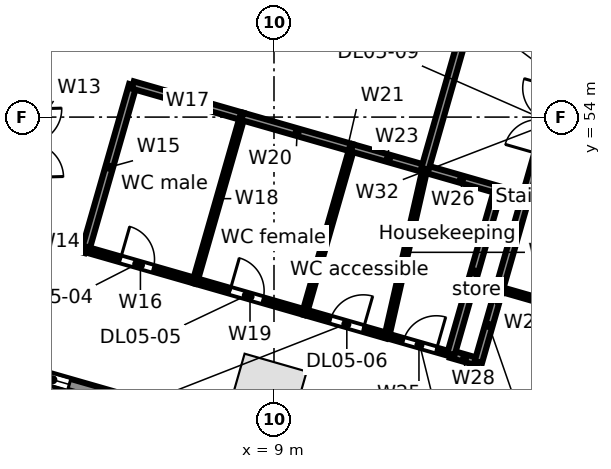
"""IFC4 building model, lengths in metres.
Left out: names, types, materials, properties, quantities, classifications, styles, units other than length and angle.
Written with IfcOpenShell. Run it as: python <this file> out.ifc"""

import sys

from ifc_helpers import new_model, si_unit, direction, frame, frame_2d, origin, origin_2d, place, context, subcontext, project, spatial, rectangle, extrude, element, fill, save


model = new_model("IFC4")
c1 = context("Model", 3, precision=1e-05, world=origin(), true_north=direction((0.0, 1.0)))
c2 = subcontext(c1, "Body", "Model", "MODEL_VIEW")
j1 = project(units=[si_unit("LENGTHUNIT", "METRE"), si_unit("PLANEANGLEUNIT", "RADIAN")], contexts=[c1])
p1 = place(None, origin())
s1 = spatial("IfcSite", under=j1, at=p1, CompositionType="ELEMENT")
p2 = place(p1, origin())
s2 = spatial("IfcBuilding", under=s1, at=p2, CompositionType="ELEMENT")
p3 = place(p2, frame((0.0, 0.0, 31.5)))
s3 = spatial("IfcBuildingStorey", under=s2, at=p3, CompositionType="ELEMENT", Elevation=31.5)
p4 = place(p3, frame((8.81, 46.722, 0.0), z_axis=(0.0, 0.0, 1.0), x_axis=(0.961261695938, -0.275637355817, 0.0)))
e1 = element("IfcColumn", 1, at=p4, inside=s3, PredefinedType="COLUMN", context=c2, shape_type="SweptSolid", body=[
    extrude(rectangle(XDim=1.7, YDim=1.7, at=origin_2d()), origin(), (0.0, 0.0, 1.0), 5.0),
])
p5 = place(p3, frame((25.398, 40.717, 0.0), z_axis=(0.0, 0.0, 1.0), x_axis=(-0.961262423262, 0.275634819324, 0.0)))
e2 = element("IfcWall", 2, at=p5, inside=s3, PredefinedType="STANDARD", context=c2, shape_type="SweptSolid", body=[
    extrude(rectangle(XDim=26.359, YDim=0.3, at=frame_2d((13.179, 0.0))), origin(), (0.0, 0.0, 1.0), 4.68),
])
p6 = place(p5, frame((22.664, 0.0, 0.6)))
e3 = element("IfcOpeningElement", 3, at=p6, cuts=e2, PredefinedType="OPENING", context=c2, shape_type="SweptSolid", body=[
    extrude(rectangle(XDim=0.9, YDim=3.2, at=frame_2d((0.45, 1.6))), frame((0.0, 0.16, 0.0), z_axis=(0.0, -1.0, 0.0), x_axis=(1.0, 0.0, 0.0)), (0.0, 0.0, 1.0), 0.32),
])
p7 = place(p5, frame((13.844, 0.0, 0.6)))
e4 = element("IfcOpeningElement", 4, at=p7, cuts=e2, PredefinedType="OPENING", context=c2, shape_type="SweptSolid", body=[
    extrude(rectangle(XDim=0.9, YDim=3.2, at=frame_2d((0.45, 1.6))), frame((0.0, 0.16, 0.0), z_axis=(0.0, -1.0, 0.0), x_axis=(1.0, 0.0, 0.0)), (0.0, 0.0, 1.0), 0.32),
])
p8 = place(p5, frame((5.023, 0.0, 0.6)))
e5 = element("IfcOpeningElement", 5, at=p8, cuts=e2, PredefinedType="OPENING", context=c2, shape_type="SweptSolid", body=[
    extrude(rectangle(XDim=0.9, YDim=3.2, at=frame_2d((0.45, 1.6))), frame((0.0, 0.16, 0.0), z_axis=(0.0, -1.0, 0.0), x_axis=(1.0, 0.0, 0.0)), (0.0, 0.0, 1.0), 0.32),
])
p9 = place(p3, frame((2.601, 50.932, 0.0), z_axis=(0.0, 0.0, 1.0), x_axis=(0.961197773994, -0.27586018065, 0.0)))
e6 = element("IfcWall", 6, at=p9, inside=s3, PredefinedType="PARTITIONING", context=c2, shape_type="SweptSolid", body=[
    extrude(rectangle(XDim=1.5, YDim=0.2, at=frame_2d((0.75, 0.0))), origin(), (0.0, 0.0, 1.0), 4.68),
])
p10 = place(p3, frame((4.043, 50.518, 0.0), z_axis=(0.0, 0.0, 1.0), x_axis=(0.275745553681, 0.96123066411, 0.0)))
e7 = element("IfcWall", 7, at=p10, inside=s3, PredefinedType="PARTITIONING", context=c2, shape_type="SweptSolid", body=[
    extrude(rectangle(XDim=4.5, YDim=0.2, at=frame_2d((2.25, 0.0))), origin(), (0.0, 0.0, 1.0), 4.68),
])
p11 = place(p3, frame((4.043, 50.518, 0.0), z_axis=(0.0, 0.0, 1.0), x_axis=(0.961247103494, -0.275688240636, 0.0)))
e8 = element("IfcWall", 8, at=p11, inside=s3, PredefinedType="PARTITIONING", context=c2, shape_type="SweptSolid", body=[
    extrude(rectangle(XDim=3.0, YDim=0.15, at=frame_2d((1.5, 0.0))), origin(), (0.0, 0.0, 1.0), 4.68),
])
p12 = place(p11, frame((0.95, 0.0, 0.0)))
e9 = element("IfcOpeningElement", 9, at=p12, cuts=e8, PredefinedType="OPENING", context=c2, shape_type="SweptSolid", body=[
    extrude(rectangle(XDim=0.9, YDim=2.1, at=frame_2d((0.45, 1.05))), frame((0.0, 0.085, 0.0), z_axis=(0.0, -1.0, 0.0), x_axis=(1.0, 0.0, 0.0)), (0.0, 0.0, 1.0), 0.17),
])
p13 = place(p3, frame((5.284, 54.844, 0.0), z_axis=(0.0, 0.0, 1.0), x_axis=(0.961243927922, -0.275699312717, 0.0)))
e10 = element("IfcWall", 10, at=p13, inside=s3, PredefinedType="PARTITIONING", context=c2, shape_type="SweptSolid", body=[
    extrude(rectangle(XDim=2.999, YDim=0.2, at=frame_2d((1.5, 0.0))), origin(), (0.0, 0.0, 1.0), 4.68),
])
p14 = place(p3, frame((6.927, 49.691, 0.0), z_axis=(0.0, 0.0, 1.0), x_axis=(0.275530671241, 0.961292280841, 0.0)))
e11 = element("IfcWall", 11, at=p14, inside=s3, PredefinedType="PARTITIONING", context=c2, shape_type="SweptSolid", body=[
    extrude(rectangle(XDim=4.5, YDim=0.125, at=frame_2d((2.25, 0.0))), origin(), (0.0, 0.0, 1.0), 4.68),
])
p15 = place(p3, frame((6.927, 49.691, 0.0), z_axis=(0.0, 0.0, 1.0), x_axis=(0.961268664977, -0.27561305073, 0.0)))
e12 = element("IfcWall", 12, at=p15, inside=s3, PredefinedType="PARTITIONING", context=c2, shape_type="SweptSolid", body=[
    extrude(rectangle(XDim=3.0, YDim=0.15, at=frame_2d((1.5, 0.0))), origin(), (0.0, 0.0, 1.0), 3.742),
])
p16 = place(p15, frame((0.95, 0.0, 0.0)))
e13 = element("IfcOpeningElement", 13, at=p16, cuts=e12, PredefinedType="OPENING", context=c2, shape_type="SweptSolid", body=[
    extrude(rectangle(XDim=0.9, YDim=2.1, at=frame_2d((0.45, 1.05))), frame((0.0, 0.085, 0.0), z_axis=(0.0, -1.0, 0.0), x_axis=(1.0, 0.0, 0.0)), (0.0, 0.0, 1.0), 0.17),
])
p17 = place(p3, frame((8.167, 54.017, 0.0), z_axis=(0.0, 0.0, 1.0), x_axis=(0.961247103494, -0.275688240636, 0.0)))
e14 = element("IfcWall", 14, at=p17, inside=s3, PredefinedType="PARTITIONING", context=c2, shape_type="SweptSolid", body=[
    extrude(rectangle(XDim=3.0, YDim=0.2, at=frame_2d((1.5, 0.0))), origin(), (0.0, 0.0, 1.0), 3.742),
])
p18 = place(p3, frame((9.811, 48.864, 0.0), z_axis=(0.0, 0.0, 1.0), x_axis=(0.275545040649, 0.96128816209, 0.0)))
e15 = element("IfcWall", 15, at=p18, inside=s3, PredefinedType="PARTITIONING", context=c2, shape_type="SweptSolid", body=[
    extrude(rectangle(XDim=4.5, YDim=0.125, at=frame_2d((2.25, 0.0))), origin(), (0.0, 0.0, 1.0), 4.68),
])
p19 = place(p3, frame((9.811, 48.864, 0.0), z_axis=(0.0, 0.0, 1.0), x_axis=(0.961236680145, -0.275724581318, 0.0)))
e16 = element("IfcWall", 16, at=p19, inside=s3, PredefinedType="PARTITIONING", context=c2, shape_type="SweptSolid", body=[
    extrude(rectangle(XDim=2.249, YDim=0.15, at=frame_2d((1.125, 0.0))), origin(), (0.0, 0.0, 1.0), 4.68),
])
p20 = place(p19, frame((0.7, 0.0, 0.0)))
e17 = element("IfcOpeningElement", 17, at=p20, cuts=e16, PredefinedType="OPENING", context=c2, shape_type="SweptSolid", body=[
    extrude(rectangle(XDim=0.9, YDim=2.1, at=frame_2d((0.45, 1.05))), frame((0.0, 0.085, 0.0), z_axis=(0.0, -1.0, 0.0), x_axis=(1.0, 0.0, 0.0)), (0.0, 0.0, 1.0), 0.17),
])
p21 = place(p3, frame((11.051, 53.19, 0.0), z_axis=(0.0, 0.0, 1.0), x_axis=(0.961316434736, -0.275446387355, 0.0)))
e18 = element("IfcWall", 18, at=p21, inside=s3, PredefinedType="PARTITIONING", context=c2, shape_type="SweptSolid", body=[
    extrude(rectangle(XDim=2.0, YDim=0.2, at=frame_2d((1.0, 0.0))), origin(), (0.0, 0.0, 1.0), 4.68),
])
p22 = place(p3, frame((11.973, 48.244, 0.0), z_axis=(0.0, 0.0, 1.0), x_axis=(0.222117362571, 0.975019936845, 0.0)))
e19 = element("IfcWall", 19, at=p22, inside=s3, PredefinedType="PARTITIONING", context=c2, shape_type="SweptSolid", body=[
    extrude(rectangle(XDim=4.508, YDim=0.125, at=frame_2d((2.254, 0.0))), origin(), (0.0, 0.0, 1.0), 4.68),
])
p23 = place(p3, frame((11.973, 48.244, 0.0), z_axis=(0.0, 0.0, 1.0), x_axis=(0.96136592135, -0.275273618907, 0.0)))
e20 = element("IfcWall", 20, at=p23, inside=s3, PredefinedType="PARTITIONING", context=c2, shape_type="SweptSolid", body=[
    extrude(rectangle(XDim=1.751, YDim=0.125, at=frame_2d((0.875, 0.0))), origin(), (0.0, 0.0, 1.0), 4.68),
])
p24 = place(p23, frame((0.45, 0.0, 0.0)))
e21 = element("IfcOpeningElement", 21, at=p24, cuts=e20, PredefinedType="OPENING", context=c2, shape_type="SweptSolid", body=[
    extrude(rectangle(XDim=0.9, YDim=2.1, at=frame_2d((0.45, 1.05))), frame((0.0, 0.073, 0.0), z_axis=(0.0, -1.0, 0.0), x_axis=(1.0, 0.0, 0.0)), (0.0, 0.0, 1.0), 0.145),
])
p25 = place(p3, frame((12.974, 52.639, 0.0), z_axis=(0.0, 0.0, 1.0), x_axis=(0.961270097305, -0.275608055084, 0.0)))
e22 = element("IfcWall", 22, at=p25, inside=s3, PredefinedType="PARTITIONING", context=c2, shape_type="SweptSolid", body=[
    extrude(rectangle(XDim=1.999, YDim=0.2, at=frame_2d((1.0, 0.0))), origin(), (0.0, 0.0, 1.0), 4.68),
])
p26 = place(p3, frame((12.974, 52.639, 0.0), z_axis=(0.0, 0.0, 1.0), x_axis=(0.275299463768, 0.961358520662, 0.0)))
e23 = element("IfcWall", 23, at=p26, inside=s3, PredefinedType="PARTITIONING", context=c2, shape_type="SweptSolid", body=[
    extrude(rectangle(XDim=14.885, YDim=0.2, at=frame_2d((7.443, 0.0))), origin(), (0.0, 0.0, 1.0), 3.742),
])
p27 = place(p3, frame((13.656, 47.762, 0.0), z_axis=(0.0, 0.0, 1.0), x_axis=(0.961154610169, -0.276010534854, 0.0)))
e24 = element("IfcWall", 24, at=p27, inside=s3, PredefinedType="PARTITIONING", context=c2, shape_type="SweptSolid", body=[
    extrude(rectangle(XDim=0.75, YDim=0.2, at=frame_2d((0.375, 0.0))), origin(), (0.0, 0.0, 1.0), 4.68),
])
p28 = place(p3, frame((13.656, 47.762, 0.0), z_axis=(0.0, 0.0, 1.0), x_axis=(0.275545040649, 0.96128816209, 0.0)))
e25 = element("IfcWall", 25, at=p28, inside=s3, PredefinedType="PARTITIONING", context=c2, shape_type="SweptSolid", body=[
    extrude(rectangle(XDim=4.5, YDim=0.2, at=frame_2d((2.25, 0.0))), origin(), (0.0, 0.0, 1.0), 4.68),
])
p29 = place(p3, frame((14.377, 47.555, 0.0), z_axis=(0.0, 0.0, 1.0), x_axis=(0.275446387355, 0.961316434736, 0.0)))
e26 = element("IfcWall", 26, at=p29, inside=s3, PredefinedType="PARTITIONING", context=c2, shape_type="SweptSolid", body=[
    extrude(rectangle(XDim=2.0, YDim=0.2, at=frame_2d((1.0, 0.0))), origin(), (0.0, 0.0, 1.0), 4.68),
])
p30 = place(p3, frame((14.928, 49.478, 0.0), z_axis=(0.0, 0.0, 1.0), x_axis=(0.961243778232, -0.27569983462, 0.0)))
e27 = element("IfcWall", 27, at=p30, inside=s3, PredefinedType="PARTITIONING", context=c2, shape_type="SweptSolid", body=[
    extrude(rectangle(XDim=1.977, YDim=0.125, at=frame_2d((0.988, 0.0))), origin(), (0.0, 0.0, 1.0), 4.68),
])
p31 = place(p3, frame((14.928, 49.478, 0.0), z_axis=(0.0, 0.0, 1.0), x_axis=(0.275674053528, 0.961251172281, 0.0)))
e28 = element("IfcWall", 28, at=p31, inside=s3, PredefinedType="PARTITIONING", context=c2, shape_type="SweptSolid", body=[
    extrude(rectangle(XDim=9.0, YDim=0.2, at=frame_2d((4.5, 0.0))), origin(), (0.0, 0.0, 1.0), 3.742),
])
p32 = place(p31, frame((3.7, 0.0, 0.0)))
e29 = element("IfcOpeningElement", 29, at=p32, cuts=e28, PredefinedType="OPENING", context=c2, shape_type="SweptSolid", body=[
    extrude(rectangle(XDim=1.8, YDim=2.1, at=frame_2d((0.9, 1.05))), frame((0.0, 0.11, 0.0), z_axis=(0.0, -1.0, 0.0), x_axis=(1.0, 0.0, 0.0)), (0.0, 0.0, 1.0), 0.22),
])
p33 = place(p6, origin())
e30 = element("IfcWindow", 30, at=p33, inside=s3, PartitioningType="SINGLE_PANEL", PredefinedType="WINDOW", context=c2, shape_type="SweptSolid", body=[
    extrude(rectangle(XDim=0.9, YDim=3.2, at=frame_2d((0.45, 1.6))), frame((0.0, 0.03, 0.0), z_axis=(0.0, -1.0, 0.0), x_axis=(1.0, 0.0, 0.0)), (0.0, 0.0, 1.0), 0.06),
])
fill(e3, e30)
p34 = place(p12, origin())
e31 = element("IfcDoor", 31, at=p34, inside=s3, OperationType="SINGLE_SWING_LEFT", PredefinedType="DOOR", context=c2, shape_type="SweptSolid", body=[
    extrude(rectangle(XDim=0.9, YDim=2.1, at=frame_2d((0.45, 1.05))), frame((0.0, 0.025, 0.0), z_axis=(0.0, -1.0, 0.0), x_axis=(1.0, 0.0, 0.0)), (0.0, 0.0, 1.0), 0.05),
])
fill(e9, e31)
p35 = place(p16, origin())
e32 = element("IfcDoor", 32, at=p35, inside=s3, OperationType="SINGLE_SWING_LEFT", PredefinedType="DOOR", context=c2, shape_type="SweptSolid", body=[
    extrude(rectangle(XDim=0.9, YDim=2.1, at=frame_2d((0.45, 1.05))), frame((0.0, 0.025, 0.0), z_axis=(0.0, -1.0, 0.0), x_axis=(1.0, 0.0, 0.0)), (0.0, 0.0, 1.0), 0.05),
])
fill(e13, e32)
p36 = place(p20, origin())
e33 = element("IfcDoor", 33, at=p36, inside=s3, OperationType="SINGLE_SWING_RIGHT", PredefinedType="DOOR", context=c2, shape_type="SweptSolid", body=[
    extrude(rectangle(XDim=0.9, YDim=2.1, at=frame_2d((0.45, 1.05))), frame((0.0, 0.025, 0.0), z_axis=(0.0, -1.0, 0.0), x_axis=(1.0, 0.0, 0.0)), (0.0, 0.0, 1.0), 0.05),
])
fill(e17, e33)
p37 = place(p24, origin())
e34 = element("IfcDoor", 34, at=p37, inside=s3, OperationType="SINGLE_SWING_RIGHT", PredefinedType="DOOR", context=c2, shape_type="SweptSolid", body=[
    extrude(rectangle(XDim=0.9, YDim=2.1, at=frame_2d((0.45, 1.05))), frame((0.0, 0.025, 0.0), z_axis=(0.0, -1.0, 0.0), x_axis=(1.0, 0.0, 0.0)), (0.0, 0.0, 1.0), 0.05),
])
fill(e21, e34)
save(model, sys.argv[1])
